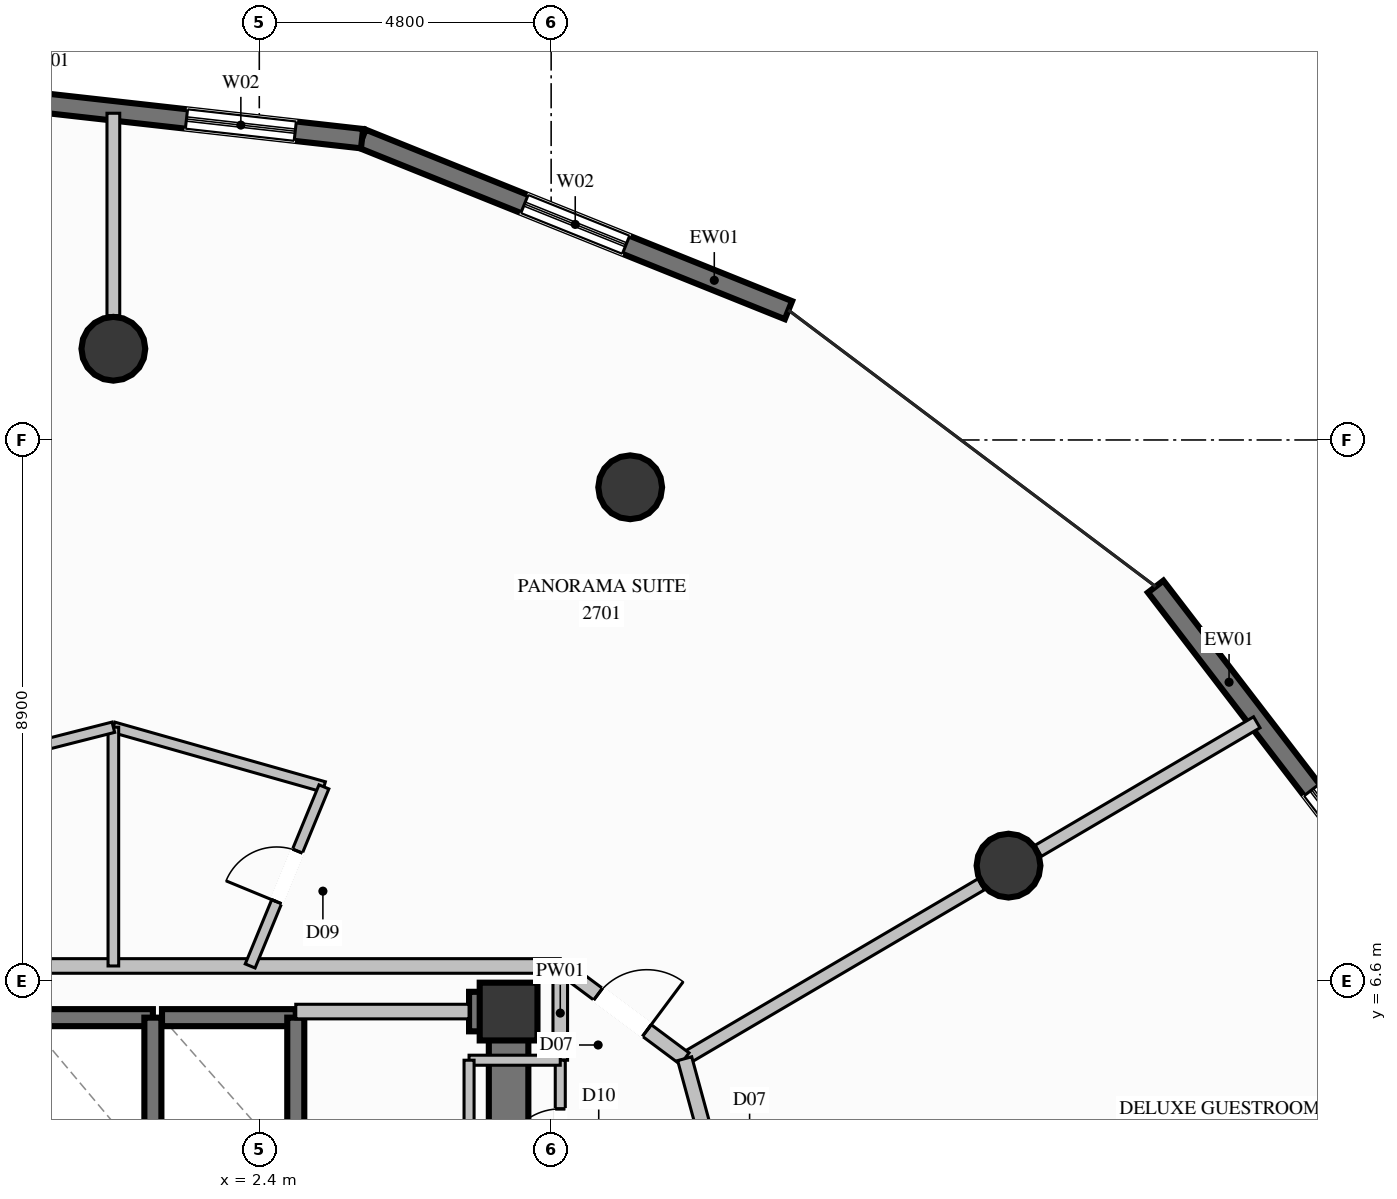
"""IFC4 building model, lengths in metres.
Left out: names, types, materials, properties, quantities, classifications, styles, units other than length and angle.
Written with IfcOpenShell. Run it as: python <this file> out.ifc"""

import sys

from ifc_helpers import new_model, si_unit, direction, frame, frame_2d, origin, origin_2d, place, context, subcontext, project, spatial, rectangle, circle, extrude, element, fill, save


model = new_model("IFC4")
c1 = context("Model", 3, precision=1e-05, world=origin(), true_north=direction((0.0, 1.0)))
c2 = subcontext(c1, "Body", "Model", "MODEL_VIEW")
j1 = project(units=[si_unit("LENGTHUNIT", "METRE"), si_unit("PLANEANGLEUNIT", "RADIAN")], contexts=[c1])
p1 = place(None, origin())
s1 = spatial("IfcSite", under=j1, at=p1, CompositionType="ELEMENT")
p2 = place(p1, origin())
s2 = spatial("IfcBuilding", under=s1, at=p2, CompositionType="ELEMENT")
p3 = place(p2, frame((0.0, 0.0, 102.6)))
s3 = spatial("IfcBuildingStorey", under=s2, at=p3, CompositionType="ELEMENT", Elevation=102.6)
p4 = place(p3, frame((6.5, 6.1, 0.0), z_axis=(0.0, 0.0, 1.0), x_axis=(1.0, 0.0, 0.0)))
e1 = element("IfcColumn", 1, at=p4, inside=s3, PredefinedType="COLUMN", context=c2, shape_type="SweptSolid", body=[
    extrude(rectangle(XDim=0.95, YDim=0.95, at=origin_2d()), origin(), (0.0, 0.0, 1.0), 3.6),
])
p5 = place(p3, frame((5.85, 6.1, 0.0), z_axis=(0.0, 0.0, 1.0), x_axis=(1.0, 0.0, 0.0)))
e2 = element("IfcWall", 2, at=p5, inside=s3, PredefinedType="SHEAR", context=c2, shape_type="SweptSolid", body=[
    extrude(rectangle(XDim=0.325, YDim=0.65, at=frame_2d((0.163, 0.0))), origin(), (0.0, 0.0, 1.0), 3.6),
])
p6 = place(p3, frame((6.5, 3.35, 0.0), z_axis=(0.0, 0.0, 1.0), x_axis=(0.0, 1.0, 0.0)))
e3 = element("IfcWall", 3, at=p6, inside=s3, PredefinedType="SHEAR", context=c2, shape_type="SweptSolid", body=[
    extrude(rectangle(XDim=3.075, YDim=0.65, at=frame_2d((1.538, 0.0))), origin(), (0.0, 0.0, 1.0), 3.6),
])
for number, where, z_axis, x_axis in (
    (4, (14.722, 8.5, 0.0), (0.0, 0.0, 1.0), (1.0, 0.0, 0.0)),
    (5, (8.5, 14.722, 0.0), (0.0, 0.0, 1.0), (1.0, 0.0, 0.0)),
    (6, (0.0, 17.0, 0.0), (0.0, 0.0, 1.0), (1.0, 0.0, 0.0)),
):
    element("IfcColumn", number, at=place(p3, frame(where, z_axis=z_axis, x_axis=x_axis)), inside=s3, PredefinedType="COLUMN", context=c2, shape_type="SweptSolid", body=[
        extrude(circle(Radius=0.525, at=origin_2d()), origin(), (0.0, 0.0, 1.0), 3.6),
    ])
p7 = place(p3, frame((17.142, 13.089, 0.0), z_axis=(0.0, 0.0, 1.0), x_axis=(0.608831916989, -0.793299247986, 0.0)))
e7 = element("IfcWall", 7, at=p7, inside=s3, PredefinedType="SOLIDWALL", context=c2, shape_type="SweptSolid", body=[
    extrude(rectangle(XDim=7.347, YDim=0.32, at=frame_2d((3.673, 0.0))), origin(), (0.0, 0.0, 1.0), 3.35),
])
p8 = place(p7, frame((4.215, 0.0, 0.35)))
e8 = element("IfcOpeningElement", 8, at=p8, cuts=e7, PredefinedType="OPENING", context=c2, shape_type="SweptSolid", body=[
    extrude(rectangle(XDim=1.8, YDim=2.6, at=frame_2d((0.9, 1.3))), frame((0.0, 0.17, 0.0), z_axis=(0.0, -1.0, 0.0), x_axis=(1.0, 0.0, 0.0)), (0.0, 0.0, 1.0), 0.34),
])
p9 = place(p3, frame((4.09, 20.455, 0.0), z_axis=(0.0, 0.0, 1.0), x_axis=(0.927795739468, -0.373088549577, 0.0)))
e9 = element("IfcWall", 9, at=p9, inside=s3, PredefinedType="SOLIDWALL", context=c2, shape_type="SweptSolid", body=[
    extrude(rectangle(XDim=7.559, YDim=0.32, at=frame_2d((3.779, 0.0))), origin(), (0.0, 0.0, 1.0), 3.35),
])
p10 = place(p9, frame((2.879, 0.0, 0.35)))
e10 = element("IfcOpeningElement", 10, at=p10, cuts=e9, PredefinedType="OPENING", context=c2, shape_type="SweptSolid", body=[
    extrude(rectangle(XDim=1.8, YDim=2.6, at=frame_2d((0.9, 1.3))), frame((0.0, 0.17, 0.0), z_axis=(0.0, -1.0, 0.0), x_axis=(1.0, 0.0, 0.0)), (0.0, 0.0, 1.0), 0.34),
])
p11 = place(p3, frame((-3.211, 21.273, 0.0), z_axis=(0.0, 0.0, 1.0), x_axis=(0.993784044115, -0.111325081016, 0.0)))
e11 = element("IfcWall", 11, at=p11, inside=s3, PredefinedType="SOLIDWALL", context=c2, shape_type="SweptSolid", body=[
    extrude(rectangle(XDim=7.347, YDim=0.32, at=frame_2d((3.673, 0.0))), origin(), (0.0, 0.0, 1.0), 3.35),
])
p12 = place(p11, frame((4.441, 0.0, 0.35)))
e12 = element("IfcOpeningElement", 12, at=p12, cuts=e11, PredefinedType="OPENING", context=c2, shape_type="SweptSolid", body=[
    extrude(rectangle(XDim=1.8, YDim=2.6, at=frame_2d((0.9, 1.3))), frame((0.0, 0.17, 0.0), z_axis=(0.0, -1.0, 0.0), x_axis=(1.0, 0.0, 0.0)), (0.0, 0.0, 1.0), 0.34),
])
p13 = place(p3, frame((0.65, 6.0, 0.0), z_axis=(0.0, 0.0, 1.0), x_axis=(-1.0, 0.0, 0.0)))
e13 = element("IfcWall", 13, at=p13, inside=s3, PredefinedType="SOLIDWALL", context=c2, shape_type="SweptSolid", body=[
    extrude(rectangle(XDim=2.1, YDim=0.28, at=frame_2d((1.05, 0.0))), origin(), (0.0, 0.0, 1.0), 3.35),
])
p14 = place(p3, frame((0.65, 3.5, 0.0), z_axis=(0.0, 0.0, 1.0), x_axis=(0.0, 1.0, 0.0)))
e14 = element("IfcWall", 14, at=p14, inside=s3, PredefinedType="SOLIDWALL", context=c2, shape_type="SweptSolid", body=[
    extrude(rectangle(XDim=2.5, YDim=0.28, at=frame_2d((1.25, 0.0))), origin(), (0.0, 0.0, 1.0), 3.35),
])
p15 = place(p3, frame((3.0, 6.0, 0.0), z_axis=(0.0, 0.0, 1.0), x_axis=(-1.0, 0.0, 0.0)))
e15 = element("IfcWall", 15, at=p15, inside=s3, PredefinedType="SOLIDWALL", context=c2, shape_type="SweptSolid", body=[
    extrude(rectangle(XDim=2.2, YDim=0.28, at=frame_2d((1.1, 0.0))), origin(), (0.0, 0.0, 1.0), 3.35),
])
p16 = place(p3, frame((3.0, 3.5, 0.0), z_axis=(0.0, 0.0, 1.0), x_axis=(0.0, 1.0, 0.0)))
e16 = element("IfcWall", 16, at=p16, inside=s3, PredefinedType="SOLIDWALL", context=c2, shape_type="SweptSolid", body=[
    extrude(rectangle(XDim=2.5, YDim=0.28, at=frame_2d((1.25, 0.0))), origin(), (0.0, 0.0, 1.0), 3.35),
])
p17 = place(p3, frame((-7.35, 6.85, 0.0), z_axis=(0.0, 0.0, 1.0), x_axis=(1.0, 0.0, 0.0)))
e17 = element("IfcWall", 17, at=p17, inside=s3, PredefinedType="PARTITIONING", context=c2, shape_type="SweptSolid", body=[
    extrude(rectangle(XDim=14.7, YDim=0.24, at=frame_2d((7.35, 0.0))), origin(), (0.0, 0.0, 1.0), 2.435),
])
p18 = place(p3, frame((7.35, 5.3, 0.0), z_axis=(0.0, 0.0, 1.0), x_axis=(0.0, 1.0, 0.0)))
e18 = element("IfcWall", 18, at=p18, inside=s3, PredefinedType="PARTITIONING", context=c2, shape_type="SweptSolid", body=[
    extrude(rectangle(XDim=1.55, YDim=0.24, at=frame_2d((0.775, 0.0))), origin(), (0.0, 0.0, 1.0), 2.435),
])
p19 = place(p3, frame((3.0, 6.1, 0.0), z_axis=(0.0, 0.0, 1.0), x_axis=(1.0, 0.0, 0.0)))
e19 = element("IfcWall", 19, at=p19, inside=s3, PredefinedType="PARTITIONING", context=c2, shape_type="SweptSolid", body=[
    extrude(rectangle(XDim=2.85, YDim=0.24, at=frame_2d((1.425, 0.0))), origin(), (0.0, 0.0, 1.0), 2.435),
])
p20 = place(p3, frame((7.35, 2.75, 0.0), z_axis=(0.0, 0.0, 1.0), x_axis=(0.0, 1.0, 0.0)))
e20 = element("IfcWall", 20, at=p20, inside=s3, PredefinedType="PARTITIONING", context=c2, shape_type="SweptSolid", body=[
    extrude(rectangle(XDim=2.55, YDim=0.165, at=frame_2d((1.275, 0.0))), origin(), (0.0, 0.0, 1.0), 3.35),
])
p21 = place(p20, frame((0.8, 0.0, 0.0)))
e21 = element("IfcOpeningElement", 21, at=p21, cuts=e20, PredefinedType="OPENING", context=c2, shape_type="SweptSolid", body=[
    extrude(rectangle(XDim=0.95, YDim=2.1, at=frame_2d((0.475, 1.05))), frame((0.0, 0.093, 0.0), z_axis=(0.0, -1.0, 0.0), x_axis=(1.0, 0.0, 0.0)), (0.0, 0.0, 1.0), 0.185),
])
p22 = place(p3, frame((7.35, 5.3, 0.0), z_axis=(0.0, 0.0, 1.0), x_axis=(-1.0, 0.0, 0.0)))
e22 = element("IfcWall", 22, at=p22, inside=s3, PredefinedType="PARTITIONING", context=c2, shape_type="SweptSolid", body=[
    extrude(rectangle(XDim=1.5, YDim=0.165, at=frame_2d((0.75, 0.0))), origin(), (0.0, 0.0, 1.0), 2.435),
])
p23 = place(p3, frame((5.85, 5.3, 0.0), z_axis=(0.0, 0.0, 1.0), x_axis=(0.0, -1.0, 0.0)))
e23 = element("IfcWall", 23, at=p23, inside=s3, PredefinedType="PARTITIONING", context=c2, shape_type="SweptSolid", body=[
    extrude(rectangle(XDim=2.55, YDim=0.165, at=frame_2d((1.275, 0.0))), origin(), (0.0, 0.0, 1.0), 2.435),
])
p24 = place(p3, frame((9.396, 5.325, 0.0), z_axis=(0.0, 0.0, 1.0), x_axis=(0.862032950085, 0.506852239778, 0.0)))
e24 = element("IfcWall", 24, at=p24, inside=s3, PredefinedType="PARTITIONING", context=c2, shape_type="SweptSolid", body=[
    extrude(rectangle(XDim=5.656, YDim=0.21, at=frame_2d((2.828, 0.0))), origin(), (0.0, 0.0, 1.0), 2.791),
])
p25 = place(p3, frame((15.21, 8.743, 0.0), z_axis=(0.0, 0.0, 1.0), x_axis=(0.862004936616, 0.506899880894, 0.0)))
e25 = element("IfcWall", 25, at=p25, inside=s3, PredefinedType="PARTITIONING", context=c2, shape_type="SweptSolid", body=[
    extrude(rectangle(XDim=4.17, YDim=0.21, at=frame_2d((2.085, 0.0))), origin(), (0.0, 0.0, 1.0), 3.35),
])
p26 = place(p3, frame((0.0, 10.776, 0.0), z_axis=(0.0, 0.0, 1.0), x_axis=(0.962140957865, -0.272552338459, 0.0)))
e26 = element("IfcWall", 26, at=p26, inside=s3, PredefinedType="PLUMBINGWALL", context=c2, shape_type="SweptSolid", body=[
    extrude(rectangle(XDim=3.599, YDim=0.175, at=frame_2d((1.8, 0.0))), origin(), (0.0, 0.0, 1.0), 2.985),
])
p27 = place(p3, frame((0.0, 10.776, 0.0), z_axis=(0.0, 0.0, 1.0), x_axis=(0.0, -1.0, 0.0)))
e27 = element("IfcWall", 27, at=p27, inside=s3, PredefinedType="PLUMBINGWALL", context=c2, shape_type="SweptSolid", body=[
    extrude(rectangle(XDim=3.926, YDim=0.175, at=frame_2d((1.963, 0.0))), origin(), (0.0, 0.0, 1.0), 3.35),
])
p28 = place(p3, frame((2.25, 6.85, 0.0), z_axis=(0.0, 0.0, 1.0), x_axis=(0.380834625893, 0.924643167779, 0.0)))
e28 = element("IfcWall", 28, at=p28, inside=s3, PredefinedType="PLUMBINGWALL", context=c2, shape_type="SweptSolid", body=[
    extrude(rectangle(XDim=3.185, YDim=0.175, at=frame_2d((1.592, 0.0))), origin(), (0.0, 0.0, 1.0), 3.35),
])
p29 = place(p28, frame((1.143, 0.0, 0.0)))
e29 = element("IfcOpeningElement", 29, at=p29, cuts=e28, PredefinedType="OPENING", context=c2, shape_type="SweptSolid", body=[
    extrude(rectangle(XDim=0.9, YDim=2.1, at=frame_2d((0.45, 1.05))), frame((0.0, 0.098, 0.0), z_axis=(0.0, -1.0, 0.0), x_axis=(1.0, 0.0, 0.0)), (0.0, 0.0, 1.0), 0.195),
])
p30 = place(p3, frame((0.0, 17.545, 0.0), z_axis=(0.0, 0.0, 1.0), x_axis=(0.0, 1.0, 0.0)))
e30 = element("IfcWall", 30, at=p30, inside=s3, PredefinedType="PARTITIONING", context=c2, shape_type="SweptSolid", body=[
    extrude(rectangle(XDim=3.328, YDim=0.21, at=frame_2d((1.664, 0.0))), origin(), (0.0, 0.0, 1.0), 3.35),
])
p31 = place(p3, frame((7.35, 6.85, 0.0), z_axis=(0.0, 0.0, 1.0), x_axis=(0.8017416961, -0.597670689205, 0.0)))
e31 = element("IfcWall", 31, at=p31, inside=s3, PredefinedType="PARTITIONING", context=c2, shape_type="SweptSolid", body=[
    extrude(rectangle(XDim=2.552, YDim=0.24, at=frame_2d((1.276, 0.0))), origin(), (0.0, 0.0, 1.0), 3.35),
])
p32 = place(p31, frame((0.776, 0.0, 0.0)))
e32 = element("IfcOpeningElement", 32, at=p32, cuts=e31, PredefinedType="OPENING", context=c2, shape_type="SweptSolid", body=[
    extrude(rectangle(XDim=1.0, YDim=2.2, at=frame_2d((0.5, 1.1))), frame((0.0, 0.13, 0.0), z_axis=(0.0, -1.0, 0.0), x_axis=(1.0, 0.0, 0.0)), (0.0, 0.0, 1.0), 0.26),
])
p33 = place(p3, frame((-3.584, 9.865, 0.0), z_axis=(0.0, 0.0, 1.0), x_axis=(0.969187500781, 0.246324152957, 0.0)))
e33 = element("IfcWall", 33, at=p33, inside=s3, PredefinedType="PLUMBINGWALL", context=c2, shape_type="SweptSolid", body=[
    extrude(rectangle(XDim=3.698, YDim=0.175, at=frame_2d((1.849, 0.0))), origin(), (0.0, 0.0, 1.0), 2.985),
])
p34 = place(p3, frame((10.239, 2.236, 0.0), z_axis=(0.0, 0.0, 1.0), x_axis=(-0.26329160366, 0.964716295831, 0.0)))
e34 = element("IfcWall", 34, at=p34, inside=s3, PredefinedType="PARTITIONING", context=c2, shape_type="SweptSolid", body=[
    extrude(rectangle(XDim=3.202, YDim=0.24, at=frame_2d((1.601, 0.0))), origin(), (0.0, 0.0, 1.0), 3.35),
])
p35 = place(p34, frame((1.101, 0.0, 0.0)))
e35 = element("IfcOpeningElement", 35, at=p35, cuts=e34, PredefinedType="OPENING", context=c2, shape_type="SweptSolid", body=[
    extrude(rectangle(XDim=1.0, YDim=2.2, at=frame_2d((0.5, 1.1))), frame((0.0, 0.13, 0.0), z_axis=(0.0, -1.0, 0.0), x_axis=(1.0, 0.0, 0.0)), (0.0, 0.0, 1.0), 0.26),
])
p36 = place(p8, origin())
e36 = element("IfcWindow", 36, at=p36, inside=s3, PartitioningType="SINGLE_PANEL", PredefinedType="WINDOW", context=c2, shape_type="SweptSolid", body=[
    extrude(rectangle(XDim=1.8, YDim=2.6, at=frame_2d((0.9, 1.3))), frame((0.0, 0.03, 0.0), z_axis=(0.0, -1.0, 0.0), x_axis=(1.0, 0.0, 0.0)), (0.0, 0.0, 1.0), 0.06),
])
fill(e8, e36)
p37 = place(p10, origin())
e37 = element("IfcWindow", 37, at=p37, inside=s3, PartitioningType="SINGLE_PANEL", PredefinedType="WINDOW", context=c2, shape_type="SweptSolid", body=[
    extrude(rectangle(XDim=1.8, YDim=2.6, at=frame_2d((0.9, 1.3))), frame((0.0, 0.03, 0.0), z_axis=(0.0, -1.0, 0.0), x_axis=(1.0, 0.0, 0.0)), (0.0, 0.0, 1.0), 0.06),
])
fill(e10, e37)
p38 = place(p12, origin())
e38 = element("IfcWindow", 38, at=p38, inside=s3, PartitioningType="SINGLE_PANEL", PredefinedType="WINDOW", context=c2, shape_type="SweptSolid", body=[
    extrude(rectangle(XDim=1.8, YDim=2.6, at=frame_2d((0.9, 1.3))), frame((0.0, 0.03, 0.0), z_axis=(0.0, -1.0, 0.0), x_axis=(1.0, 0.0, 0.0)), (0.0, 0.0, 1.0), 0.06),
])
fill(e12, e38)
p39 = place(p21, origin())
e39 = element("IfcDoor", 39, at=p39, inside=s3, OperationType="SINGLE_SWING_LEFT", PredefinedType="DOOR", context=c2, shape_type="SweptSolid", body=[
    extrude(rectangle(XDim=0.95, YDim=2.1, at=frame_2d((0.475, 1.05))), frame((0.0, 0.025, 0.0), z_axis=(0.0, -1.0, 0.0), x_axis=(1.0, 0.0, 0.0)), (0.0, 0.0, 1.0), 0.05),
])
fill(e21, e39)
p40 = place(p29, origin())
e40 = element("IfcDoor", 40, at=p40, inside=s3, OperationType="SINGLE_SWING_LEFT", PredefinedType="DOOR", context=c2, shape_type="SweptSolid", body=[
    extrude(rectangle(XDim=0.9, YDim=2.1, at=frame_2d((0.45, 1.05))), frame((0.0, 0.025, 0.0), z_axis=(0.0, -1.0, 0.0), x_axis=(1.0, 0.0, 0.0)), (0.0, 0.0, 1.0), 0.05),
])
fill(e29, e40)
p41 = place(p32, origin())
e41 = element("IfcDoor", 41, at=p41, inside=s3, OperationType="SINGLE_SWING_RIGHT", PredefinedType="DOOR", context=c2, shape_type="SweptSolid", body=[
    extrude(rectangle(XDim=1.0, YDim=2.2, at=frame_2d((0.5, 1.1))), frame((0.0, 0.025, 0.0), z_axis=(0.0, -1.0, 0.0), x_axis=(1.0, 0.0, 0.0)), (0.0, 0.0, 1.0), 0.05),
])
fill(e32, e41)
save(model, sys.argv[1])
